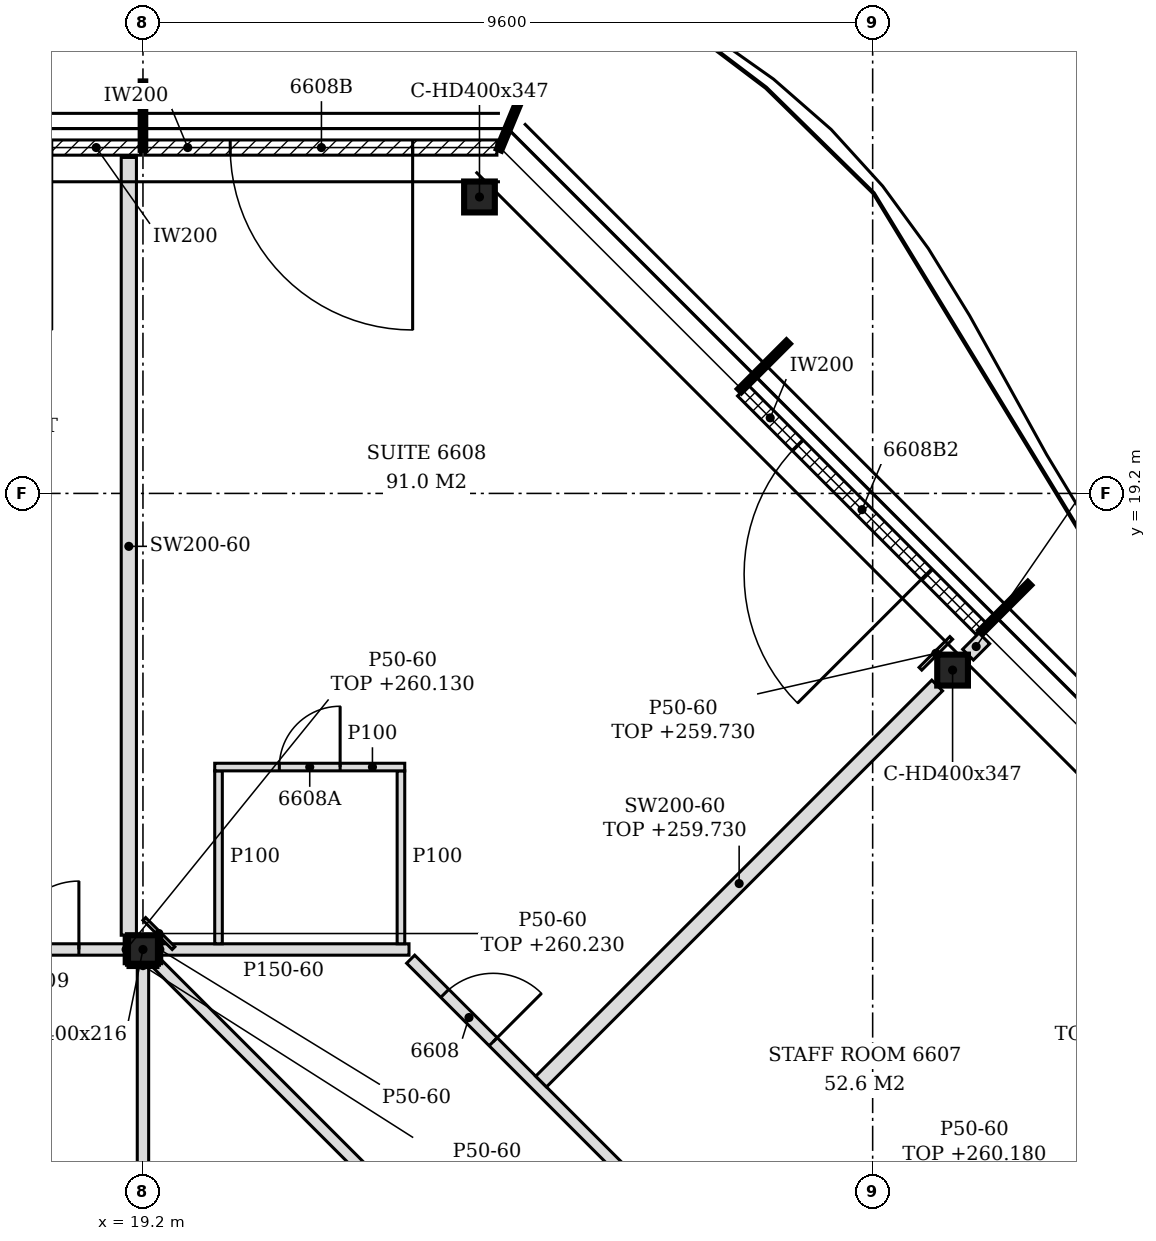
"""IFC4 building model, lengths in metres.
Left out: names, types, materials, properties, quantities, classifications, styles, units other than length and angle.
Written with IfcOpenShell. Run it as: python <this file> out.ifc"""

import sys

from ifc_helpers import new_model, si_unit, direction, frame, frame_2d, origin, origin_2d, place, context, subcontext, project, spatial, polyline, rectangle, i_section, outline, extrude, clip, halfspace, element, fill, save


model = new_model("IFC4")
c1 = context("Model", 3, precision=1e-05, world=origin(), true_north=direction((0.0, 1.0)))
c2 = subcontext(c1, "Body", "Model", "MODEL_VIEW")
j1 = project(units=[si_unit("LENGTHUNIT", "METRE"), si_unit("PLANEANGLEUNIT", "RADIAN")], contexts=[c1])
p1 = place(None, origin())
s1 = spatial("IfcSite", under=j1, at=p1, CompositionType="ELEMENT")
p2 = place(p1, origin())
s2 = spatial("IfcBuilding", under=s1, at=p2, CompositionType="ELEMENT")
p3 = place(p2, frame((0.0, 0.0, 257.4)))
s3 = spatial("IfcBuildingStorey", under=s2, at=p3, CompositionType="ELEMENT", Elevation=257.4)
for number, where, z_axis, x_axis in (
    (1, (29.852, 16.876, -0.15), (0.0, 0.0, 1.0), (1.0, 0.0, 0.0)),
    (2, (23.627, 23.1, -0.15), (0.0, 0.0, 1.0), (1.0, 0.0, 0.0)),
):
    element("IfcColumn", number, at=place(p3, frame(where, z_axis=z_axis, x_axis=x_axis)), inside=s3, PredefinedType="COLUMN", context=c2, shape_type="Clipping", body=[
        clip(extrude(i_section(OverallWidth=0.404, OverallDepth=0.407, WebThickness=0.027, FlangeThickness=0.044, FilletRadius=0.015, at=origin_2d()), origin(), (0.0, 0.0, 1.0), 3.5), halfspace(frame((0.0, 0.0, 3.05), z_axis=(0.0, 0.0, 1.0), x_axis=(1.0, 0.0, 0.0)), False)),
    ])
p4 = place(p3, frame((19.2, 13.2, -0.15), z_axis=(0.0, 0.0, 1.0), x_axis=(1.0, 0.0, 0.0)))
e3 = element("IfcColumn", 3, at=p4, inside=s3, PredefinedType="COLUMN", context=c2, shape_type="SweptSolid", body=[
    extrude(i_section(OverallWidth=0.394, OverallDepth=0.375, WebThickness=0.017, FlangeThickness=0.028, FilletRadius=0.015, at=origin_2d()), origin(), (0.0, 0.0, 1.0), 3.5),
])
p5 = place(p3, frame((30.226, 17.42, 0.0), z_axis=(0.0, 0.0, 1.0), x_axis=(-0.707079231393, 0.707134329907, 0.0)))
e4 = element("IfcWall", 4, at=p5, inside=s3, PredefinedType="NOTDEFINED", context=c2, shape_type="SweptSolid", body=[
    extrude(rectangle(XDim=4.431, YDim=0.2, at=frame_2d((2.215, 0.0))), origin(), (0.0, 0.0, 1.0), 3.35),
])
p6 = place(p5, frame((1.015, 0.0, 0.0)))
e5 = element("IfcOpeningElement", 5, at=p6, cuts=e4, PredefinedType="OPENING", context=c2, shape_type="SweptSolid", body=[
    extrude(rectangle(XDim=2.4, YDim=2.4, at=frame_2d((1.2, 1.2))), frame((0.0, 0.11, 0.0), z_axis=(0.0, -1.0, 0.0), x_axis=(1.0, 0.0, 0.0)), (0.0, 0.0, 1.0), 0.22),
])
p7 = place(p3, frame((23.856, 23.75, 0.0), z_axis=(0.0, 0.0, 1.0), x_axis=(-1.0, 0.0, 0.0)))
e6 = element("IfcWall", 6, at=p7, inside=s3, PredefinedType="NOTDEFINED", context=c2, shape_type="SweptSolid", body=[
    extrude(rectangle(XDim=4.626, YDim=0.2, at=frame_2d((2.313, 0.0))), origin(), (0.0, 0.0, 1.0), 3.35),
])
p8 = place(p7, frame((1.108, 0.0, 0.0)))
e7 = element("IfcOpeningElement", 7, at=p8, cuts=e6, PredefinedType="OPENING", context=c2, shape_type="SweptSolid", body=[
    extrude(rectangle(XDim=2.4, YDim=2.4, at=frame_2d((1.2, 1.2))), frame((0.0, 0.11, 0.0), z_axis=(0.0, -1.0, 0.0), x_axis=(1.0, 0.0, 0.0)), (0.0, 0.0, 1.0), 0.22),
])
p9 = place(p3, frame((19.17, 23.75, 0.0), z_axis=(0.0, 0.0, 1.0), x_axis=(-1.0, 0.0, 0.0)))
e8 = element("IfcWall", 8, at=p9, inside=s3, PredefinedType="NOTDEFINED", context=c2, shape_type="SweptSolid", body=[
    extrude(rectangle(XDim=4.74, YDim=0.2, at=frame_2d((2.37, 0.0))), origin(), (0.0, 0.0, 1.0), 3.35),
])
p10 = place(p9, frame((1.17, 0.0, 0.0)))
e9 = element("IfcOpeningElement", 9, at=p10, cuts=e8, PredefinedType="OPENING", context=c2, shape_type="SweptSolid", body=[
    extrude(rectangle(XDim=2.4, YDim=2.4, at=frame_2d((1.2, 1.2))), frame((0.0, 0.11, 0.0), z_axis=(0.0, -1.0, 0.0), x_axis=(1.0, 0.0, 0.0)), (0.0, 0.0, 1.0), 0.22),
])
p11 = place(p3, frame((31.129, 1.271, 0.0), z_axis=(0.0, 0.0, 1.0), x_axis=(-0.707114135277, 0.70709942702, 0.0)))
e10 = element("IfcWall", 10, at=p11, inside=s3, PredefinedType="PARTITIONING", context=c2, shape_type="SweptSolid", body=[
    extrude(rectangle(XDim=16.599, YDim=0.15, at=frame_2d((8.299, 0.0))), origin(), (0.0, 0.0, 1.0), 2.78),
])
p12 = place(p11, frame((0.55, 0.0, 0.0)))
e11 = element("IfcOpeningElement", 11, at=p12, cuts=e10, PredefinedType="OPENING", context=c2, shape_type="SweptSolid", body=[
    extrude(rectangle(XDim=0.8, YDim=2.1, at=frame_2d((0.4, 1.05))), frame((0.0, 0.085, 0.0), z_axis=(0.0, -1.0, 0.0), x_axis=(1.0, 0.0, 0.0)), (0.0, 0.0, 1.0), 0.17),
])
p13 = place(p3, frame((33.472, 2.322, 0.0), z_axis=(0.0, 0.0, 1.0), x_axis=(-0.707106781187, 0.707106781187, 0.0)))
e12 = element("IfcWall", 12, at=p13, inside=s3, PredefinedType="PARTITIONING", context=c2, shape_type="SweptSolid", body=[
    extrude(rectangle(XDim=15.203, YDim=0.15, at=frame_2d((7.602, 0.0))), origin(), (0.0, 0.0, 1.0), 2.78),
])
p14 = place(p13, frame((4.951, 0.0, 0.0)))
e13 = element("IfcOpeningElement", 13, at=p14, cuts=e12, PredefinedType="OPENING", context=c2, shape_type="SweptSolid", body=[
    extrude(rectangle(XDim=0.9, YDim=2.1, at=frame_2d((0.45, 1.05))), frame((0.0, 0.085, 0.0), z_axis=(0.0, -1.0, 0.0), x_axis=(1.0, 0.0, 0.0)), (0.0, 0.0, 1.0), 0.17),
])
p15 = place(p13, frame((9.352, 0.0, 0.0)))
e14 = element("IfcOpeningElement", 14, at=p15, cuts=e12, PredefinedType="OPENING", context=c2, shape_type="SweptSolid", body=[
    extrude(rectangle(XDim=0.9, YDim=2.1, at=frame_2d((0.45, 1.05))), frame((0.0, 0.085, 0.0), z_axis=(0.0, -1.0, 0.0), x_axis=(1.0, 0.0, 0.0)), (0.0, 0.0, 1.0), 0.17),
])
p16 = place(p13, frame((13.668, 0.0, 0.0)))
e15 = element("IfcOpeningElement", 15, at=p16, cuts=e12, PredefinedType="OPENING", context=c2, shape_type="SweptSolid", body=[
    extrude(rectangle(XDim=0.9, YDim=2.1, at=frame_2d((0.45, 1.05))), frame((0.0, 0.085, 0.0), z_axis=(0.0, -1.0, 0.0), x_axis=(1.0, 0.0, 0.0)), (0.0, 0.0, 1.0), 0.17),
])
p17 = place(p3, frame((19.2, 2.587, 0.0), z_axis=(0.0, 0.0, 1.0), x_axis=(0.0, 1.0, 0.0)))
e16 = element("IfcWall", 16, at=p17, inside=s3, PredefinedType="PARTITIONING", context=c2, shape_type="SweptSolid", body=[
    extrude(rectangle(XDim=10.425, YDim=0.15, at=frame_2d((5.212, 0.0))), origin(), (0.0, 0.0, 1.0), 2.73),
])
p18 = place(p17, frame((2.062, 0.0, 0.0)))
e17 = element("IfcOpeningElement", 17, at=p18, cuts=e16, PredefinedType="OPENING", context=c2, shape_type="SweptSolid", body=[
    extrude(rectangle(XDim=0.9, YDim=2.1, at=frame_2d((0.45, 1.05))), frame((0.0, 0.085, 0.0), z_axis=(0.0, -1.0, 0.0), x_axis=(1.0, 0.0, 0.0)), (0.0, 0.0, 1.0), 0.17),
])
p19 = place(p3, frame((30.662, 5.238, 0.0), z_axis=(0.0, 0.0, 1.0), x_axis=(0.707106781187, 0.707106781187, 0.0)))
e18 = element("IfcWall", 18, at=p19, inside=s3, PredefinedType="PARTITIONING", context=c2, shape_type="SweptSolid", body=[
    extrude(rectangle(XDim=7.369, YDim=0.2, at=frame_2d((3.685, 0.0))), origin(), (0.0, 0.0, 1.0), 2.33),
])
p20 = place(p3, frame((31.398, 9.798, 0.0), z_axis=(0.0, 0.0, 1.0), x_axis=(0.707133900936, 0.707079660397, 0.0)))
e19 = element("IfcWall", 19, at=p20, inside=s3, PredefinedType="PARTITIONING", context=c2, shape_type="SweptSolid", body=[
    extrude(rectangle(XDim=4.501, YDim=0.2, at=frame_2d((2.25, 0.0))), origin(), (0.0, 0.0, 1.0), 2.33),
])
p21 = place(p3, frame((24.438, 11.462, 0.0), z_axis=(0.0, 0.0, 1.0), x_axis=(0.707090216072, 0.707123345913, 0.0)))
e20 = element("IfcWall", 20, at=p21, inside=s3, PredefinedType="PARTITIONING", context=c2, shape_type="SweptSolid", body=[
    extrude(rectangle(XDim=7.369, YDim=0.2, at=frame_2d((3.685, 0.0))), origin(), (0.0, 0.0, 1.0), 2.33),
])
p22 = place(p3, frame((7.397, 13.2, 0.0), z_axis=(0.0, 0.0, 1.0), x_axis=(1.0, 0.0, 0.0)))
e21 = element("IfcWall", 21, at=p22, inside=s3, PredefinedType="PARTITIONING", context=c2, shape_type="SweptSolid", body=[
    extrude(rectangle(XDim=11.606, YDim=0.15, at=frame_2d((5.803, 0.0))), origin(), (0.0, 0.0, 1.0), 2.73),
])
p23 = place(p22, frame((10.06, 0.0, 0.0)))
e22 = element("IfcOpeningElement", 22, at=p23, cuts=e21, PredefinedType="OPENING", context=c2, shape_type="SweptSolid", body=[
    extrude(rectangle(XDim=0.9, YDim=2.1, at=frame_2d((0.45, 1.05))), frame((0.0, 0.085, 0.0), z_axis=(0.0, -1.0, 0.0), x_axis=(1.0, 0.0, 0.0)), (0.0, 0.0, 1.0), 0.17),
])
p24 = place(p22, frame((4.246, 0.0, 0.0)))
e23 = element("IfcOpeningElement", 23, at=p24, cuts=e21, PredefinedType="OPENING", context=c2, shape_type="SweptSolid", body=[
    extrude(rectangle(XDim=0.9, YDim=2.1, at=frame_2d((0.45, 1.05))), frame((0.0, 0.085, 0.0), z_axis=(0.0, -1.0, 0.0), x_axis=(1.0, 0.0, 0.0)), (0.0, 0.0, 1.0), 0.17),
])
p25 = place(p3, frame((19.397, 13.2, 0.0), z_axis=(0.0, 0.0, 1.0), x_axis=(1.0, 0.0, 0.0)))
e24 = element("IfcWall", 24, at=p25, inside=s3, PredefinedType="PARTITIONING", context=c2, shape_type="SweptSolid", body=[
    extrude(rectangle(XDim=3.303, YDim=0.15, at=frame_2d((1.652, 0.0))), origin(), (0.0, 0.0, 1.0), 3.35),
])
for number, where, z_axis, x_axis in (
    (25, (20.194, 13.275, 0.0), (0.0, 0.0, 1.0), (0.0, 1.0, 0.0)),
    (26, (22.594, 13.275, 0.0), (0.0, 0.0, 1.0), (0.0, 1.0, 0.0)),
):
    element("IfcWall", number, at=place(p3, frame(where, z_axis=z_axis, x_axis=x_axis)), inside=s3, PredefinedType="PARTITIONING", context=c2, shape_type="SweptSolid", body=[
        extrude(outline(polyline([(0.0, 0.0), (2.275, 0.0), (2.275, 3.35), (1.23, 3.35), (1.228, 2.78), (1.02, 2.78), (1.018, 3.35), (0.0, 3.35), (0.0, 0.0)])), frame((0.0, 0.05, 0.0), z_axis=(0.0, -1.0, 0.0), x_axis=(1.0, 0.0, 0.0)), (0.0, 0.0, 1.0), 0.1),
    ])
p26 = place(p3, frame((19.014, 13.387, 0.0), z_axis=(0.0, 0.0, 1.0), x_axis=(0.0, 1.0, 0.0)))
e27 = element("IfcWall", 27, at=p26, inside=s3, PredefinedType="PARTITIONING", context=c2, shape_type="SweptSolid", body=[
    extrude(outline(polyline([(0.0, 0.0), (10.233, 0.0), (10.232, 3.35), (10.212, 3.35), (10.21, 2.33), (9.212, 2.33), (9.21, 2.83), (5.917, 2.83), (5.916, 2.78), (5.708, 2.78), (5.706, 2.83), (0.01, 2.83), (0.008, 3.35), (0.0, 3.35), (0.0, 0.0)])), frame((0.0, 0.1, 0.0), z_axis=(0.0, -1.0, 0.0), x_axis=(1.0, 0.0, 0.0)), (0.0, 0.0, 1.0), 0.2),
])
p27 = place(p3, frame((20.144, 15.6, 0.0), z_axis=(0.0, 0.0, 1.0), x_axis=(1.0, 0.0, 0.0)))
e28 = element("IfcWall", 28, at=p27, inside=s3, PredefinedType="PARTITIONING", context=c2, shape_type="SweptSolid", body=[
    extrude(rectangle(XDim=2.5, YDim=0.1, at=frame_2d((1.25, 0.0))), origin(), (0.0, 0.0, 1.0), 3.35),
])
p28 = place(p27, frame((0.85, 0.0, 0.0)))
e29 = element("IfcOpeningElement", 29, at=p28, cuts=e28, PredefinedType="OPENING", context=c2, shape_type="SweptSolid", body=[
    extrude(rectangle(XDim=0.8, YDim=2.1, at=frame_2d((0.4, 1.05))), frame((0.0, 0.06, 0.0), z_axis=(0.0, -1.0, 0.0), x_axis=(1.0, 0.0, 0.0)), (0.0, 0.0, 1.0), 0.12),
])
p29 = place(p3, frame((30.054, 17.078, 0.0), z_axis=(0.0, 0.0, 1.0), x_axis=(0.707106781187, 0.707106781187, 0.0)))
e30 = element("IfcWall", 30, at=p29, inside=s3, PredefinedType="PARTITIONING", context=c2, shape_type="SweptSolid", body=[
    extrude(rectangle(XDim=0.303, YDim=0.2, at=frame_2d((0.152, 0.0))), origin(), (0.0, 0.0, 1.0), 2.33),
])
p30 = place(p3, frame((18.978, 13.012, 0.0), z_axis=(0.0, 0.0, 1.0), x_axis=(0.0, 1.0, 0.0)))
e31 = element("IfcWall", 31, at=p30, inside=s3, PredefinedType="PARTITIONING", context=c2, shape_type="SweptSolid", body=[
    extrude(rectangle(XDim=0.375, YDim=0.05, at=frame_2d((0.188, 0.0))), origin(), (0.0, 0.0, 1.0), 2.73),
])
p31 = place(p3, frame((19.602, 13.218, 0.0), z_axis=(0.0, 0.0, 1.0), x_axis=(-0.707106781187, 0.707106781187, 0.0)))
e32 = element("IfcWall", 32, at=p31, inside=s3, PredefinedType="PARTITIONING", context=c2, shape_type="SweptSolid", body=[
    extrude(rectangle(XDim=0.544, YDim=0.05, at=frame_2d((0.272, 0.0))), origin(), (0.0, 0.0, 1.0), 2.83),
])
p32 = place(p3, frame((29.428, 16.893, 0.0), z_axis=(0.0, 0.0, 1.0), x_axis=(0.707106781187, 0.707106781187, 0.0)))
e33 = element("IfcWall", 33, at=p32, inside=s3, PredefinedType="PARTITIONING", context=c2, shape_type="SweptSolid", body=[
    extrude(rectangle(XDim=0.573, YDim=0.05, at=frame_2d((0.287, 0.0))), origin(), (0.0, 0.0, 1.0), 2.33),
])
p33 = place(p3, frame((19.003, 12.988, 0.0), z_axis=(0.0, 0.0, 1.0), x_axis=(1.0, 0.0, 0.0)))
e34 = element("IfcWall", 34, at=p33, inside=s3, PredefinedType="PARTITIONING", context=c2, shape_type="SweptSolid", body=[
    extrude(rectangle(XDim=0.394, YDim=0.05, at=frame_2d((0.197, 0.0))), origin(), (0.0, 0.0, 1.0), 2.73),
])
p34 = place(p3, frame((19.422, 13.012, 0.0), z_axis=(0.0, 0.0, 1.0), x_axis=(0.0, 1.0, 0.0)))
e35 = element("IfcWall", 35, at=p34, inside=s3, PredefinedType="PARTITIONING", context=c2, shape_type="SweptSolid", body=[
    extrude(rectangle(XDim=0.375, YDim=0.05, at=frame_2d((0.188, 0.0))), origin(), (0.0, 0.0, 1.0), 3.35),
])
p35 = place(p6, origin())
e36 = element("IfcDoor", 36, at=p35, inside=s3, OperationType="SINGLE_SWING_LEFT", PredefinedType="DOOR", context=c2, shape_type="SweptSolid", body=[
    extrude(rectangle(XDim=2.4, YDim=2.4, at=frame_2d((1.2, 1.2))), frame((0.0, 0.025, 0.0), z_axis=(0.0, -1.0, 0.0), x_axis=(1.0, 0.0, 0.0)), (0.0, 0.0, 1.0), 0.05),
])
fill(e5, e36)
p36 = place(p8, origin())
e37 = element("IfcDoor", 37, at=p36, inside=s3, OperationType="SINGLE_SWING_LEFT", PredefinedType="DOOR", context=c2, shape_type="SweptSolid", body=[
    extrude(rectangle(XDim=2.4, YDim=2.4, at=frame_2d((1.2, 1.2))), frame((0.0, 0.025, 0.0), z_axis=(0.0, -1.0, 0.0), x_axis=(1.0, 0.0, 0.0)), (0.0, 0.0, 1.0), 0.05),
])
fill(e7, e37)
p37 = place(p16, frame((0.9, 0.0, 0.0), z_axis=(0.0, 0.0, 1.0), x_axis=(-1.0, 0.0, 0.0)))
e38 = element("IfcDoor", 38, at=p37, inside=s3, OperationType="SINGLE_SWING_RIGHT", PredefinedType="DOOR", context=c2, shape_type="SweptSolid", body=[
    extrude(rectangle(XDim=0.9, YDim=2.1, at=frame_2d((0.45, 1.05))), frame((0.0, 0.025, 0.0), z_axis=(0.0, -1.0, 0.0), x_axis=(1.0, 0.0, 0.0)), (0.0, 0.0, 1.0), 0.05),
])
fill(e15, e38)
p38 = place(p28, origin())
e39 = element("IfcDoor", 39, at=p38, inside=s3, OperationType="SINGLE_SWING_RIGHT", PredefinedType="DOOR", context=c2, shape_type="SweptSolid", body=[
    extrude(rectangle(XDim=0.8, YDim=2.1, at=frame_2d((0.4, 1.05))), frame((0.0, 0.025, 0.0), z_axis=(0.0, -1.0, 0.0), x_axis=(1.0, 0.0, 0.0)), (0.0, 0.0, 1.0), 0.05),
])
fill(e29, e39)
p39 = place(p23, origin())
e40 = element("IfcDoor", 40, at=p39, inside=s3, OperationType="SINGLE_SWING_RIGHT", PredefinedType="DOOR", context=c2, shape_type="SweptSolid", body=[
    extrude(rectangle(XDim=0.9, YDim=2.1, at=frame_2d((0.45, 1.05))), frame((0.0, 0.025, 0.0), z_axis=(0.0, -1.0, 0.0), x_axis=(1.0, 0.0, 0.0)), (0.0, 0.0, 1.0), 0.05),
])
fill(e22, e40)
save(model, sys.argv[1])
